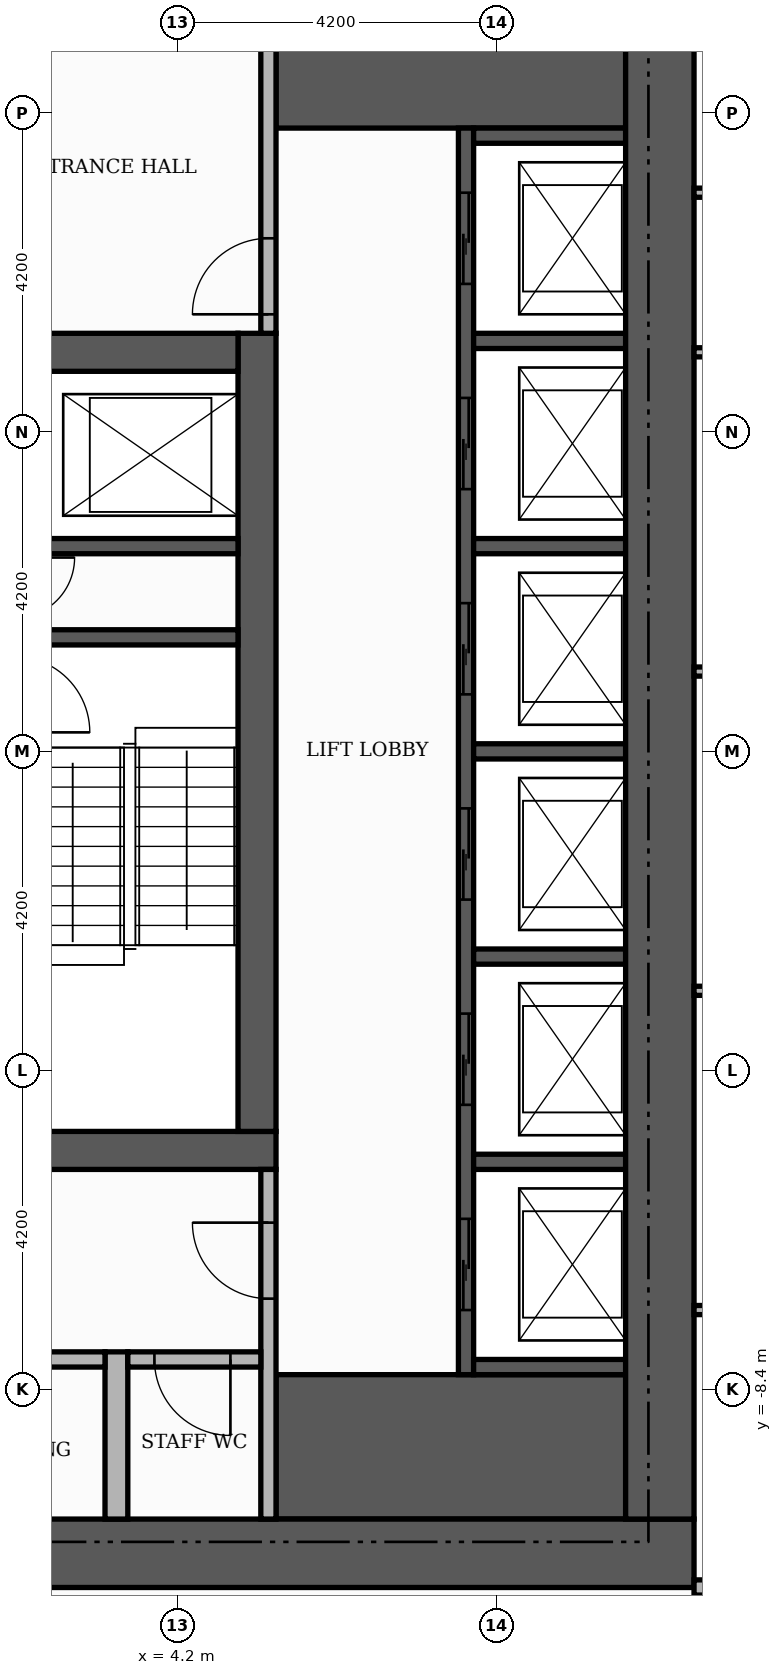
"""IFC4 building model, lengths in metres.
Left out: names, types, materials, properties, quantities, classifications, styles, units other than length and angle.
Written with IfcOpenShell. Run it as: python <this file> out.ifc"""

import sys

from ifc_helpers import new_model, si_unit, direction, frame, frame_2d, origin, place, context, subcontext, project, spatial, rectangle, extrude, element, fill, save


model = new_model("IFC4")
c1 = context("Model", 3, precision=1e-05, world=origin(), true_north=direction((0.0, 1.0)))
c2 = subcontext(c1, "Body", "Model", "MODEL_VIEW")
j1 = project(units=[si_unit("LENGTHUNIT", "METRE"), si_unit("PLANEANGLEUNIT", "RADIAN")], contexts=[c1])
p1 = place(None, origin())
s1 = spatial("IfcSite", under=j1, at=p1, CompositionType="ELEMENT")
p2 = place(p1, origin())
s2 = spatial("IfcBuilding", under=s1, at=p2, CompositionType="ELEMENT")
p3 = place(p2, frame((0.0, 0.0, 219.6)))
s3 = spatial("IfcBuildingStorey", under=s2, at=p3, CompositionType="ELEMENT", Elevation=219.6)
p4 = place(p3, frame((-5.5, -5.25, 0.0), z_axis=(0.0, 0.0, 1.0), x_axis=(1.0, 0.0, 0.0)))
e1 = element("IfcWall", 1, at=p4, inside=s3, PredefinedType="SHEAR", context=c2, shape_type="SweptSolid", body=[
    extrude(rectangle(XDim=11.0, YDim=0.5, at=frame_2d((5.5, 0.0))), origin(), (0.0, 0.0, 1.0), 3.48),
])
p5 = place(p4, frame((4.9, 0.0, 0.0)))
e2 = element("IfcOpeningElement", 2, at=p5, cuts=e1, PredefinedType="OPENING", context=c2, shape_type="SweptSolid", body=[
    extrude(rectangle(XDim=1.2, YDim=2.1, at=frame_2d((0.6, 1.05))), frame((0.0, 0.26, 0.0), z_axis=(0.0, -1.0, 0.0), x_axis=(1.0, 0.0, 0.0)), (0.0, 0.0, 1.0), 0.52),
])
p6 = place(p3, frame((5.25, -5.0, 0.0), z_axis=(0.0, 0.0, 1.0), x_axis=(0.0, 1.0, 0.0)))
e3 = element("IfcWall", 3, at=p6, inside=s3, PredefinedType="SHEAR", context=c2, shape_type="SweptSolid", body=[
    extrude(rectangle(XDim=10.5, YDim=0.5, at=frame_2d((5.25, 0.0))), origin(), (0.0, 0.0, 1.0), 3.48),
])
p7 = place(p3, frame((-5.0, 5.25, 0.0), z_axis=(0.0, 0.0, 1.0), x_axis=(1.0, 0.0, 0.0)))
e4 = element("IfcWall", 4, at=p7, inside=s3, PredefinedType="SHEAR", context=c2, shape_type="SweptSolid", body=[
    extrude(rectangle(XDim=10.0, YDim=0.5, at=frame_2d((5.0, 0.0))), origin(), (0.0, 0.0, 1.0), 3.48),
])
p8 = place(p7, frame((4.4, 0.0, 0.0)))
e5 = element("IfcOpeningElement", 5, at=p8, cuts=e4, PredefinedType="OPENING", context=c2, shape_type="SweptSolid", body=[
    extrude(rectangle(XDim=1.2, YDim=2.1, at=frame_2d((0.6, 1.05))), frame((0.0, 0.26, 0.0), z_axis=(0.0, -1.0, 0.0), x_axis=(1.0, 0.0, 0.0)), (0.0, 0.0, 1.0), 0.52),
])
for number, where, z_axis, x_axis in (
    (6, (5.5, -9.15, 0.0), (0.0, 0.0, 1.0), (1.0, 0.0, 0.0)),
    (7, (5.5, 9.15, 0.0), (0.0, 0.0, 1.0), (1.0, 0.0, 0.0)),
):
    element("IfcWall", number, at=place(p3, frame(where, z_axis=z_axis, x_axis=x_axis)), inside=s3, PredefinedType="SHEAR", context=c2, shape_type="SweptSolid", body=[
        extrude(rectangle(XDim=4.6, YDim=1.9, at=frame_2d((2.3, 0.0))), origin(), (0.0, 0.0, 1.0), 3.48),
    ])
p9 = place(p3, frame((2.15, 1.5, 0.0), z_axis=(0.0, 0.0, 1.0), x_axis=(1.0, 0.0, 0.0)))
e8 = element("IfcWall", 8, at=p9, inside=s3, PredefinedType="SHEAR", context=c2, shape_type="SweptSolid", body=[
    extrude(rectangle(XDim=2.85, YDim=0.2, at=frame_2d((1.425, 0.0))), origin(), (0.0, 0.0, 1.0), 3.48),
])
p10 = place(p3, frame((8.0, -8.2, 0.0), z_axis=(0.0, 0.0, 1.0), x_axis=(0.0, 1.0, 0.0)))
e9 = element("IfcWall", 9, at=p10, inside=s3, PredefinedType="SHEAR", context=c2, shape_type="SweptSolid", body=[
    extrude(rectangle(XDim=16.4, YDim=0.2, at=frame_2d((8.2, 0.0))), origin(), (0.0, 0.0, 1.0), 3.48),
])
p11 = place(p10, frame((0.85, 0.0, 0.0)))
e10 = element("IfcOpeningElement", 10, at=p11, cuts=e9, PredefinedType="OPENING", context=c2, shape_type="SweptSolid", body=[
    extrude(rectangle(XDim=1.2, YDim=2.1, at=frame_2d((0.6, 1.05))), frame((0.0, 0.11, 0.0), z_axis=(0.0, -1.0, 0.0), x_axis=(1.0, 0.0, 0.0)), (0.0, 0.0, 1.0), 0.22),
])
p12 = place(p10, frame((3.55, 0.0, 0.0)))
e11 = element("IfcOpeningElement", 11, at=p12, cuts=e9, PredefinedType="OPENING", context=c2, shape_type="SweptSolid", body=[
    extrude(rectangle(XDim=1.2, YDim=2.1, at=frame_2d((0.6, 1.05))), frame((0.0, 0.11, 0.0), z_axis=(0.0, -1.0, 0.0), x_axis=(1.0, 0.0, 0.0)), (0.0, 0.0, 1.0), 0.22),
])
p13 = place(p10, frame((6.25, 0.0, 0.0)))
e12 = element("IfcOpeningElement", 12, at=p13, cuts=e9, PredefinedType="OPENING", context=c2, shape_type="SweptSolid", body=[
    extrude(rectangle(XDim=1.2, YDim=2.1, at=frame_2d((0.6, 1.05))), frame((0.0, 0.11, 0.0), z_axis=(0.0, -1.0, 0.0), x_axis=(1.0, 0.0, 0.0)), (0.0, 0.0, 1.0), 0.22),
])
p14 = place(p10, frame((8.95, 0.0, 0.0)))
e13 = element("IfcOpeningElement", 13, at=p14, cuts=e9, PredefinedType="OPENING", context=c2, shape_type="SweptSolid", body=[
    extrude(rectangle(XDim=1.2, YDim=2.1, at=frame_2d((0.6, 1.05))), frame((0.0, 0.11, 0.0), z_axis=(0.0, -1.0, 0.0), x_axis=(1.0, 0.0, 0.0)), (0.0, 0.0, 1.0), 0.22),
])
p15 = place(p10, frame((11.65, 0.0, 0.0)))
e14 = element("IfcOpeningElement", 14, at=p15, cuts=e9, PredefinedType="OPENING", context=c2, shape_type="SweptSolid", body=[
    extrude(rectangle(XDim=1.2, YDim=2.1, at=frame_2d((0.6, 1.05))), frame((0.0, 0.11, 0.0), z_axis=(0.0, -1.0, 0.0), x_axis=(1.0, 0.0, 0.0)), (0.0, 0.0, 1.0), 0.22),
])
p16 = place(p10, frame((14.35, 0.0, 0.0)))
e15 = element("IfcOpeningElement", 15, at=p16, cuts=e9, PredefinedType="OPENING", context=c2, shape_type="SweptSolid", body=[
    extrude(rectangle(XDim=1.2, YDim=2.1, at=frame_2d((0.6, 1.05))), frame((0.0, 0.11, 0.0), z_axis=(0.0, -1.0, 0.0), x_axis=(1.0, 0.0, 0.0)), (0.0, 0.0, 1.0), 0.22),
])
for number, where, z_axis, x_axis in (
    (16, (8.1, -8.1, 0.0), (0.0, 0.0, 1.0), (1.0, 0.0, 0.0)),
    (17, (8.1, -5.4, 0.0), (0.0, 0.0, 1.0), (1.0, 0.0, 0.0)),
    (18, (8.1, -2.7, 0.0), (0.0, 0.0, 1.0), (1.0, 0.0, 0.0)),
    (19, (8.1, 0.0, 0.0), (0.0, 0.0, 1.0), (1.0, 0.0, 0.0)),
):
    element("IfcWall", number, at=place(p3, frame(where, z_axis=z_axis, x_axis=x_axis)), inside=s3, PredefinedType="SHEAR", context=c2, shape_type="SweptSolid", body=[
        extrude(rectangle(XDim=2.0, YDim=0.2, at=frame_2d((1.0, 0.0))), origin(), (0.0, 0.0, 1.0), 3.48),
    ])
p17 = place(p3, frame((2.15, 2.7, 0.0), z_axis=(0.0, 0.0, 1.0), x_axis=(1.0, 0.0, 0.0)))
e20 = element("IfcWall", 20, at=p17, inside=s3, PredefinedType="SHEAR", context=c2, shape_type="SweptSolid", body=[
    extrude(rectangle(XDim=2.85, YDim=0.2, at=frame_2d((1.425, 0.0))), origin(), (0.0, 0.0, 1.0), 3.48),
])
for number, where, z_axis, x_axis in (
    (21, (8.1, 2.7, 0.0), (0.0, 0.0, 1.0), (1.0, 0.0, 0.0)),
    (22, (8.1, 5.4, 0.0), (0.0, 0.0, 1.0), (1.0, 0.0, 0.0)),
    (23, (8.1, 8.1, 0.0), (0.0, 0.0, 1.0), (1.0, 0.0, 0.0)),
):
    element("IfcWall", number, at=place(p3, frame(where, z_axis=z_axis, x_axis=x_axis)), inside=s3, PredefinedType="SHEAR", context=c2, shape_type="SweptSolid", body=[
        extrude(rectangle(XDim=2.0, YDim=0.2, at=frame_2d((1.0, 0.0))), origin(), (0.0, 0.0, 1.0), 3.48),
    ])
p18 = place(p3, frame((-11.0, -10.55, 0.0), z_axis=(0.0, 0.0, 1.0), x_axis=(1.0, 0.0, 0.0)))
e24 = element("IfcWall", 24, at=p18, inside=s3, PredefinedType="SHEAR", context=c2, shape_type="SweptSolid", body=[
    extrude(rectangle(XDim=22.0, YDim=0.9, at=frame_2d((11.0, 0.0))), origin(), (0.0, 0.0, 1.0), 3.48),
])
p19 = place(p18, frame((7.4, 0.0, 0.0)))
e25 = element("IfcOpeningElement", 25, at=p19, cuts=e24, PredefinedType="OPENING", context=c2, shape_type="SweptSolid", body=[
    extrude(rectangle(XDim=1.8, YDim=2.2, at=frame_2d((0.9, 1.1))), frame((0.0, 0.46, 0.0), z_axis=(0.0, -1.0, 0.0), x_axis=(1.0, 0.0, 0.0)), (0.0, 0.0, 1.0), 0.92),
])
p20 = place(p3, frame((10.55, -10.1, 0.0), z_axis=(0.0, 0.0, 1.0), x_axis=(0.0, 1.0, 0.0)))
e26 = element("IfcWall", 26, at=p20, inside=s3, PredefinedType="SHEAR", context=c2, shape_type="SweptSolid", body=[
    extrude(rectangle(XDim=20.2, YDim=0.9, at=frame_2d((10.1, 0.0))), origin(), (0.0, 0.0, 1.0), 3.48),
])
p21 = place(p3, frame((3.4, -10.1, 0.0), z_axis=(0.0, 0.0, 1.0), x_axis=(0.0, 1.0, 0.0)))
e27 = element("IfcWall", 27, at=p21, inside=s3, PredefinedType="PARTITIONING", context=c2, shape_type="SweptSolid", body=[
    extrude(rectangle(XDim=2.2, YDim=0.3, at=frame_2d((1.1, 0.0))), origin(), (0.0, 0.0, 1.0), 3.48),
])
p22 = place(p3, frame((5.4, -10.1, 0.0), z_axis=(0.0, 0.0, 1.0), x_axis=(0.0, 1.0, 0.0)))
e28 = element("IfcWall", 28, at=p22, inside=s3, PredefinedType="PARTITIONING", context=c2, shape_type="SweptSolid", body=[
    extrude(rectangle(XDim=4.6, YDim=0.2, at=frame_2d((2.3, 0.0))), origin(), (0.0, 0.0, 1.0), 3.48),
])
p23 = place(p22, frame((2.9, 0.0, 0.0)))
e29 = element("IfcOpeningElement", 29, at=p23, cuts=e28, PredefinedType="OPENING", context=c2, shape_type="SweptSolid", body=[
    extrude(rectangle(XDim=1.0, YDim=2.1, at=frame_2d((0.5, 1.05))), frame((0.0, 0.11, 0.0), z_axis=(0.0, -1.0, 0.0), x_axis=(1.0, 0.0, 0.0)), (0.0, 0.0, 1.0), 0.22),
])
p24 = place(p3, frame((0.1, -8.0, 0.0), z_axis=(0.0, 0.0, 1.0), x_axis=(1.0, 0.0, 0.0)))
e30 = element("IfcWall", 30, at=p24, inside=s3, PredefinedType="PARTITIONING", context=c2, shape_type="SweptSolid", body=[
    extrude(rectangle(XDim=3.15, YDim=0.2, at=frame_2d((1.575, 0.0))), origin(), (0.0, 0.0, 1.0), 3.48),
])
p25 = place(p24, frame((1.15, 0.0, 0.0)))
e31 = element("IfcOpeningElement", 31, at=p25, cuts=e30, PredefinedType="OPENING", context=c2, shape_type="SweptSolid", body=[
    extrude(rectangle(XDim=0.9, YDim=2.1, at=frame_2d((0.45, 1.05))), frame((0.0, 0.11, 0.0), z_axis=(0.0, -1.0, 0.0), x_axis=(1.0, 0.0, 0.0)), (0.0, 0.0, 1.0), 0.22),
])
p26 = place(p3, frame((3.55, -8.0, 0.0), z_axis=(0.0, 0.0, 1.0), x_axis=(1.0, 0.0, 0.0)))
e32 = element("IfcWall", 32, at=p26, inside=s3, PredefinedType="PARTITIONING", context=c2, shape_type="SweptSolid", body=[
    extrude(rectangle(XDim=1.75, YDim=0.2, at=frame_2d((0.875, 0.0))), origin(), (0.0, 0.0, 1.0), 3.48),
])
p27 = place(p26, frame((0.35, 0.0, 0.0)))
e33 = element("IfcOpeningElement", 33, at=p27, cuts=e32, PredefinedType="OPENING", context=c2, shape_type="SweptSolid", body=[
    extrude(rectangle(XDim=1.0, YDim=2.1, at=frame_2d((0.5, 1.05))), frame((0.0, 0.11, 0.0), z_axis=(0.0, -1.0, 0.0), x_axis=(1.0, 0.0, 0.0)), (0.0, 0.0, 1.0), 0.22),
])
p28 = place(p3, frame((5.4, 5.5, 0.0), z_axis=(0.0, 0.0, 1.0), x_axis=(0.0, 1.0, 0.0)))
e34 = element("IfcWall", 34, at=p28, inside=s3, PredefinedType="PARTITIONING", context=c2, shape_type="SweptSolid", body=[
    extrude(rectangle(XDim=4.6, YDim=0.2, at=frame_2d((2.3, 0.0))), origin(), (0.0, 0.0, 1.0), 3.48),
])
p29 = place(p28, frame((0.25, 0.0, 0.0)))
e35 = element("IfcOpeningElement", 35, at=p29, cuts=e34, PredefinedType="OPENING", context=c2, shape_type="SweptSolid", body=[
    extrude(rectangle(XDim=1.0, YDim=2.1, at=frame_2d((0.5, 1.05))), frame((0.0, 0.11, 0.0), z_axis=(0.0, -1.0, 0.0), x_axis=(1.0, 0.0, 0.0)), (0.0, 0.0, 1.0), 0.22),
])
p30 = place(p3, frame((11.0, -11.0, 0.0), z_axis=(0.0, 0.0, 1.0), x_axis=(1.0, 0.0, 0.0)))
e36 = element("IfcWall", 36, at=p30, inside=s3, PredefinedType="PARTITIONING", context=c2, shape_type="SweptSolid", body=[
    extrude(rectangle(XDim=2.65, YDim=0.2, at=frame_2d((1.325, 0.0))), origin(), (0.0, 0.0, 1.0), 3.48),
])
p31 = place(p30, frame((0.775, 0.0, 0.0)))
e37 = element("IfcOpeningElement", 37, at=p31, cuts=e36, PredefinedType="OPENING", context=c2, shape_type="SweptSolid", body=[
    extrude(rectangle(XDim=1.1, YDim=2.4, at=frame_2d((0.55, 1.2))), frame((0.0, 0.11, 0.0), z_axis=(0.0, -1.0, 0.0), x_axis=(1.0, 0.0, 0.0)), (0.0, 0.0, 1.0), 0.22),
])
p32 = place(p3, frame((11.0, -7.35, 0.0), z_axis=(0.0, 0.0, 1.0), x_axis=(1.0, 0.0, 0.0)))
e38 = element("IfcWall", 38, at=p32, inside=s3, PredefinedType="PARTITIONING", context=c2, shape_type="SweptSolid", body=[
    extrude(rectangle(XDim=7.92, YDim=0.12, at=frame_2d((3.96, 0.0))), origin(), (0.0, 0.0, 1.0), 3.48),
])
p33 = place(p32, frame((3.51, 0.0, 0.0)))
e39 = element("IfcOpeningElement", 39, at=p33, cuts=e38, PredefinedType="OPENING", context=c2, shape_type="SweptSolid", body=[
    extrude(rectangle(XDim=0.9, YDim=2.1, at=frame_2d((0.45, 1.05))), frame((0.0, 0.07, 0.0), z_axis=(0.0, -1.0, 0.0), x_axis=(1.0, 0.0, 0.0)), (0.0, 0.0, 1.0), 0.14),
])
for number, where, z_axis, x_axis in (
    (40, (11.0, -3.15, 0.0), (0.0, 0.0, 1.0), (1.0, 0.0, 0.0)),
    (41, (11.0, 1.05, 0.0), (0.0, 0.0, 1.0), (1.0, 0.0, 0.0)),
    (42, (11.0, 5.25, 0.0), (0.0, 0.0, 1.0), (1.0, 0.0, 0.0)),
    (43, (11.0, 7.35, 0.0), (0.0, 0.0, 1.0), (1.0, 0.0, 0.0)),
):
    element("IfcWall", number, at=place(p3, frame(where, z_axis=z_axis, x_axis=x_axis)), inside=s3, PredefinedType="PARTITIONING", context=c2, shape_type="SweptSolid", body=[
        extrude(rectangle(XDim=7.92, YDim=0.12, at=frame_2d((3.96, 0.0))), origin(), (0.0, 0.0, 1.0), 3.48),
    ])
p34 = place(p11, origin())
e44 = element("IfcDoor", 44, at=p34, inside=s3, OperationType="SLIDING_TO_LEFT", PredefinedType="DOOR", context=c2, shape_type="SweptSolid", body=[
    extrude(rectangle(XDim=1.2, YDim=2.1, at=frame_2d((0.6, 1.05))), frame((0.0, 0.025, 0.0), z_axis=(0.0, -1.0, 0.0), x_axis=(1.0, 0.0, 0.0)), (0.0, 0.0, 1.0), 0.05),
])
fill(e10, e44)
p35 = place(p12, origin())
e45 = element("IfcDoor", 45, at=p35, inside=s3, OperationType="SLIDING_TO_LEFT", PredefinedType="DOOR", context=c2, shape_type="SweptSolid", body=[
    extrude(rectangle(XDim=1.2, YDim=2.1, at=frame_2d((0.6, 1.05))), frame((0.0, 0.025, 0.0), z_axis=(0.0, -1.0, 0.0), x_axis=(1.0, 0.0, 0.0)), (0.0, 0.0, 1.0), 0.05),
])
fill(e11, e45)
p36 = place(p13, origin())
e46 = element("IfcDoor", 46, at=p36, inside=s3, OperationType="SLIDING_TO_LEFT", PredefinedType="DOOR", context=c2, shape_type="SweptSolid", body=[
    extrude(rectangle(XDim=1.2, YDim=2.1, at=frame_2d((0.6, 1.05))), frame((0.0, 0.025, 0.0), z_axis=(0.0, -1.0, 0.0), x_axis=(1.0, 0.0, 0.0)), (0.0, 0.0, 1.0), 0.05),
])
fill(e12, e46)
p37 = place(p14, origin())
e47 = element("IfcDoor", 47, at=p37, inside=s3, OperationType="SLIDING_TO_LEFT", PredefinedType="DOOR", context=c2, shape_type="SweptSolid", body=[
    extrude(rectangle(XDim=1.2, YDim=2.1, at=frame_2d((0.6, 1.05))), frame((0.0, 0.025, 0.0), z_axis=(0.0, -1.0, 0.0), x_axis=(1.0, 0.0, 0.0)), (0.0, 0.0, 1.0), 0.05),
])
fill(e13, e47)
p38 = place(p15, origin())
e48 = element("IfcDoor", 48, at=p38, inside=s3, OperationType="SLIDING_TO_LEFT", PredefinedType="DOOR", context=c2, shape_type="SweptSolid", body=[
    extrude(rectangle(XDim=1.2, YDim=2.1, at=frame_2d((0.6, 1.05))), frame((0.0, 0.025, 0.0), z_axis=(0.0, -1.0, 0.0), x_axis=(1.0, 0.0, 0.0)), (0.0, 0.0, 1.0), 0.05),
])
fill(e14, e48)
p39 = place(p16, origin())
e49 = element("IfcDoor", 49, at=p39, inside=s3, OperationType="SLIDING_TO_LEFT", PredefinedType="DOOR", context=c2, shape_type="SweptSolid", body=[
    extrude(rectangle(XDim=1.2, YDim=2.1, at=frame_2d((0.6, 1.05))), frame((0.0, 0.025, 0.0), z_axis=(0.0, -1.0, 0.0), x_axis=(1.0, 0.0, 0.0)), (0.0, 0.0, 1.0), 0.05),
])
fill(e15, e49)
p40 = place(p29, origin())
e50 = element("IfcDoor", 50, at=p40, inside=s3, OperationType="SINGLE_SWING_LEFT", PredefinedType="DOOR", context=c2, shape_type="SweptSolid", body=[
    extrude(rectangle(XDim=1.0, YDim=2.1, at=frame_2d((0.5, 1.05))), frame((0.0, 0.025, 0.0), z_axis=(0.0, -1.0, 0.0), x_axis=(1.0, 0.0, 0.0)), (0.0, 0.0, 1.0), 0.05),
])
fill(e35, e50)
p41 = place(p23, origin())
e51 = element("IfcDoor", 51, at=p41, inside=s3, OperationType="SINGLE_SWING_RIGHT", PredefinedType="DOOR", context=c2, shape_type="SweptSolid", body=[
    extrude(rectangle(XDim=1.0, YDim=2.1, at=frame_2d((0.5, 1.05))), frame((0.0, 0.025, 0.0), z_axis=(0.0, -1.0, 0.0), x_axis=(1.0, 0.0, 0.0)), (0.0, 0.0, 1.0), 0.05),
])
fill(e29, e51)
p42 = place(p27, frame((1.0, 0.0, 0.0), z_axis=(0.0, 0.0, 1.0), x_axis=(-1.0, 0.0, 0.0)))
e52 = element("IfcDoor", 52, at=p42, inside=s3, OperationType="SINGLE_SWING_RIGHT", PredefinedType="DOOR", context=c2, shape_type="SweptSolid", body=[
    extrude(rectangle(XDim=1.0, YDim=2.1, at=frame_2d((0.5, 1.05))), frame((0.0, 0.025, 0.0), z_axis=(0.0, -1.0, 0.0), x_axis=(1.0, 0.0, 0.0)), (0.0, 0.0, 1.0), 0.05),
])
fill(e33, e52)
save(model, sys.argv[1])
